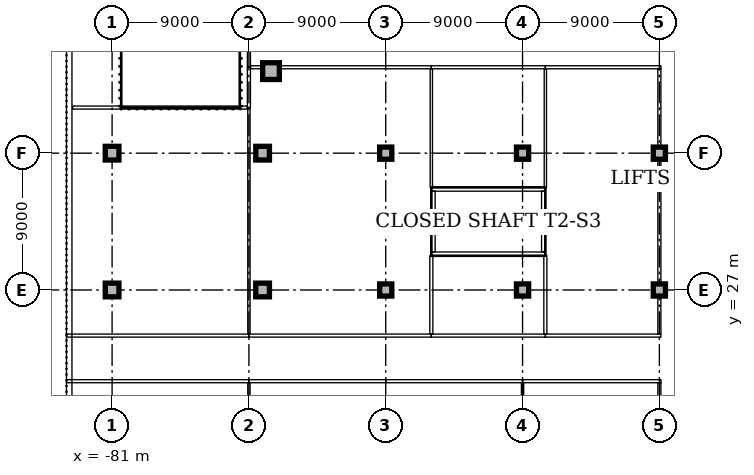
"""IFC4 building model, lengths in metres.
Left out: names, types, materials, properties, quantities, classifications, styles, units other than length and angle.
Written with IfcOpenShell. Run it as: python <this file> out.ifc"""

import sys

from ifc_helpers import new_model, si_unit, direction, frame, frame_2d, origin, origin_2d, place, context, subcontext, project, spatial, rectangle, extrude, element, fill, save


model = new_model("IFC4")
c1 = context("Model", 3, precision=1e-05, world=origin(), true_north=direction((0.0, 1.0)))
c2 = subcontext(c1, "Body", "Model", "MODEL_VIEW")
j1 = project(units=[si_unit("LENGTHUNIT", "METRE"), si_unit("PLANEANGLEUNIT", "RADIAN")], contexts=[c1])
p1 = place(None, origin())
s1 = spatial("IfcSite", under=j1, at=p1, CompositionType="ELEMENT")
p2 = place(p1, origin())
s2 = spatial("IfcBuilding", under=s1, at=p2, CompositionType="ELEMENT")
p3 = place(p2, origin())
s3 = spatial("IfcBuildingStorey", under=s2, at=p3, CompositionType="ELEMENT", Elevation=0.0)
for number, where, z_axis, x_axis in (
    (1, (-60.0, 29.375, 0.0), (0.0, 0.0, 1.0), (1.0, 0.0, 0.0)),
    (2, (-52.5, 33.625, 0.0), (0.0, 0.0, 1.0), (-1.0, 0.0, 0.0)),
):
    element("IfcWall", number, at=place(p3, frame(where, z_axis=z_axis, x_axis=x_axis)), inside=s3, PredefinedType="SOLIDWALL", context=c2, shape_type="SweptSolid", body=[
        extrude(rectangle(XDim=7.5, YDim=0.25, at=frame_2d((3.75, 0.0))), origin(), (0.0, 0.0, 1.0), 6.0),
    ])
for number, where, z_axis, x_axis in (
    (3, (-52.625, 29.5, 0.0), (0.0, 0.0, 1.0), (0.0, 1.0, 0.0)),
    (4, (-59.875, 33.5, 0.0), (0.0, 0.0, 1.0), (0.0, -1.0, 0.0)),
):
    element("IfcWall", number, at=place(p3, frame(where, z_axis=z_axis, x_axis=x_axis)), inside=s3, PredefinedType="SOLIDWALL", context=c2, shape_type="SweptSolid", body=[
        extrude(rectangle(XDim=4.0, YDim=0.25, at=frame_2d((2.0, 0.0))), origin(), (0.0, 0.0, 1.0), 6.0),
    ])
p4 = place(p3, frame((-70.547, 41.398, 0.0), z_axis=(0.0, 0.0, 1.0), x_axis=(1.0, 0.0, 0.0)))
e5 = element("IfcColumn", 5, at=p4, inside=s3, PredefinedType="COLUMN", context=c2, shape_type="SweptSolid", body=[
    extrude(rectangle(XDim=1.1, YDim=1.1, at=origin_2d()), origin(), (0.0, 0.0, 1.0), 5.7),
])
for number, where, z_axis, x_axis in (
    (6, (-71.1, 27.0, 0.0), (0.0, 0.0, 1.0), (1.0, 0.0, 0.0)),
    (7, (-71.1, 36.0, 0.0), (0.0, 0.0, 1.0), (1.0, 0.0, 0.0)),
):
    element("IfcColumn", number, at=place(p3, frame(where, z_axis=z_axis, x_axis=x_axis)), inside=s3, PredefinedType="COLUMN", context=c2, shape_type="SweptSolid", body=[
        extrude(rectangle(XDim=0.9, YDim=0.9, at=origin_2d()), origin(), (0.0, 0.0, 1.0), 5.7),
    ])
for number, where, z_axis, x_axis in (
    (8, (-63.0, 27.0, 0.0), (0.0, 0.0, 1.0), (1.0, 0.0, 0.0)),
    (9, (-63.0, 36.0, 0.0), (0.0, 0.0, 1.0), (1.0, 0.0, 0.0)),
    (10, (-54.0, 27.0, 0.0), (0.0, 0.0, 1.0), (1.0, 0.0, 0.0)),
    (11, (-54.0, 36.0, 0.0), (0.0, 0.0, 1.0), (1.0, 0.0, 0.0)),
    (12, (-45.0, 27.0, 0.0), (0.0, 0.0, 1.0), (1.0, 0.0, 0.0)),
    (13, (-45.0, 36.0, 0.0), (0.0, 0.0, 1.0), (1.0, 0.0, 0.0)),
):
    element("IfcColumn", number, at=place(p3, frame(where, z_axis=z_axis, x_axis=x_axis)), inside=s3, PredefinedType="COLUMN", context=c2, shape_type="SweptSolid", body=[
        extrude(rectangle(XDim=0.8, YDim=0.8, at=origin_2d()), origin(), (0.0, 0.0, 1.0), 5.7),
    ])
for number, where, z_axis, x_axis in (
    (14, (-81.0, 27.0, 0.0), (0.0, 0.0, 1.0), (1.0, 0.0, 0.0)),
    (15, (-81.0, 36.0, 0.0), (0.0, 0.0, 1.0), (1.0, 0.0, 0.0)),
):
    element("IfcColumn", number, at=place(p3, frame(where, z_axis=z_axis, x_axis=x_axis)), inside=s3, PredefinedType="COLUMN", context=c2, shape_type="SweptSolid", body=[
        extrude(rectangle(XDim=0.9, YDim=0.9, at=origin_2d()), origin(), (0.0, 0.0, 1.0), 5.7),
    ])
p5 = place(p3, frame((-83.82, 54.0, 0.0), z_axis=(0.0, 0.0, 1.0), x_axis=(0.0, -1.0, 0.0)))
e16 = element("IfcWall", 16, at=p5, inside=s3, PredefinedType="STANDARD", context=c2, shape_type="SweptSolid", body=[
    extrude(rectangle(XDim=63.0, YDim=0.36, at=frame_2d((31.5, 0.0))), origin(), (0.0, 0.0, 1.0), 5.7),
])
p6 = place(p5, frame((41.4, 0.0, 0.0)))
e17 = element("IfcOpeningElement", 17, at=p6, cuts=e16, PredefinedType="OPENING", context=c2, shape_type="SweptSolid", body=[
    extrude(rectangle(XDim=1.2, YDim=2.2, at=frame_2d((0.6, 1.1))), frame((0.0, 0.19, 0.0), z_axis=(0.0, -1.0, 0.0), x_axis=(1.0, 0.0, 0.0)), (0.0, 0.0, 1.0), 0.38),
])
p7 = place(p5, frame((30.3, 0.0, 0.0)))
e18 = element("IfcOpeningElement", 18, at=p7, cuts=e16, PredefinedType="OPENING", context=c2, shape_type="SweptSolid", body=[
    extrude(rectangle(XDim=2.4, YDim=2.2, at=frame_2d((1.2, 1.1))), frame((0.0, 0.19, 0.0), z_axis=(0.0, -1.0, 0.0), x_axis=(1.0, 0.0, 0.0)), (0.0, 0.0, 1.0), 0.38),
])
p8 = place(p5, frame((11.85, 0.0, 0.6)))
e19 = element("IfcOpeningElement", 19, at=p8, cuts=e16, PredefinedType="OPENING", context=c2, shape_type="SweptSolid", body=[
    extrude(rectangle(XDim=3.3, YDim=3.0, at=frame_2d((1.65, 1.5))), frame((0.0, 0.19, 0.0), z_axis=(0.0, -1.0, 0.0), x_axis=(1.0, 0.0, 0.0)), (0.0, 0.0, 1.0), 0.38),
])
p9 = place(p5, frame((16.35, 0.0, 0.6)))
e20 = element("IfcOpeningElement", 20, at=p9, cuts=e16, PredefinedType="OPENING", context=c2, shape_type="SweptSolid", body=[
    extrude(rectangle(XDim=3.3, YDim=3.0, at=frame_2d((1.65, 1.5))), frame((0.0, 0.19, 0.0), z_axis=(0.0, -1.0, 0.0), x_axis=(1.0, 0.0, 0.0)), (0.0, 0.0, 1.0), 0.38),
])
p10 = place(p5, frame((20.85, 0.0, 0.6)))
e21 = element("IfcOpeningElement", 21, at=p10, cuts=e16, PredefinedType="OPENING", context=c2, shape_type="SweptSolid", body=[
    extrude(rectangle(XDim=3.3, YDim=3.0, at=frame_2d((1.65, 1.5))), frame((0.0, 0.19, 0.0), z_axis=(0.0, -1.0, 0.0), x_axis=(1.0, 0.0, 0.0)), (0.0, 0.0, 1.0), 0.38),
])
p11 = place(p5, frame((25.35, 0.0, 0.6)))
e22 = element("IfcOpeningElement", 22, at=p11, cuts=e16, PredefinedType="OPENING", context=c2, shape_type="SweptSolid", body=[
    extrude(rectangle(XDim=3.3, YDim=3.0, at=frame_2d((1.65, 1.5))), frame((0.0, 0.19, 0.0), z_axis=(0.0, -1.0, 0.0), x_axis=(1.0, 0.0, 0.0)), (0.0, 0.0, 1.0), 0.38),
])
p12 = place(p5, frame((34.35, 0.0, 0.6)))
e23 = element("IfcOpeningElement", 23, at=p12, cuts=e16, PredefinedType="OPENING", context=c2, shape_type="SweptSolid", body=[
    extrude(rectangle(XDim=3.3, YDim=3.0, at=frame_2d((1.65, 1.5))), frame((0.0, 0.19, 0.0), z_axis=(0.0, -1.0, 0.0), x_axis=(1.0, 0.0, 0.0)), (0.0, 0.0, 1.0), 0.38),
])
p13 = place(p5, frame((43.35, 0.0, 0.6)))
e24 = element("IfcOpeningElement", 24, at=p13, cuts=e16, PredefinedType="OPENING", context=c2, shape_type="SweptSolid", body=[
    extrude(rectangle(XDim=3.3, YDim=3.0, at=frame_2d((1.65, 1.5))), frame((0.0, 0.19, 0.0), z_axis=(0.0, -1.0, 0.0), x_axis=(1.0, 0.0, 0.0)), (0.0, 0.0, 1.0), 0.38),
])
p14 = place(p5, frame((47.85, 0.0, 0.6)))
e25 = element("IfcOpeningElement", 25, at=p14, cuts=e16, PredefinedType="OPENING", context=c2, shape_type="SweptSolid", body=[
    extrude(rectangle(XDim=3.3, YDim=3.0, at=frame_2d((1.65, 1.5))), frame((0.0, 0.19, 0.0), z_axis=(0.0, -1.0, 0.0), x_axis=(1.0, 0.0, 0.0)), (0.0, 0.0, 1.0), 0.38),
])
p15 = place(p5, frame((52.35, 0.0, 0.6)))
e26 = element("IfcOpeningElement", 26, at=p15, cuts=e16, PredefinedType="OPENING", context=c2, shape_type="SweptSolid", body=[
    extrude(rectangle(XDim=3.3, YDim=3.0, at=frame_2d((1.65, 1.5))), frame((0.0, 0.19, 0.0), z_axis=(0.0, -1.0, 0.0), x_axis=(1.0, 0.0, 0.0)), (0.0, 0.0, 1.0), 0.38),
])
p16 = place(p5, frame((56.85, 0.0, 0.6)))
e27 = element("IfcOpeningElement", 27, at=p16, cuts=e16, PredefinedType="OPENING", context=c2, shape_type="SweptSolid", body=[
    extrude(rectangle(XDim=3.3, YDim=3.0, at=frame_2d((1.65, 1.5))), frame((0.0, 0.19, 0.0), z_axis=(0.0, -1.0, 0.0), x_axis=(1.0, 0.0, 0.0)), (0.0, 0.0, 1.0), 0.38),
])
p17 = place(p3, frame((-72.0, 41.65, 0.0), z_axis=(0.0, 0.0, 1.0), x_axis=(0.0, 1.0, 0.0)))
e28 = element("IfcWall", 28, at=p17, inside=s3, PredefinedType="PARTITIONING", context=c2, shape_type="SweptSolid", body=[
    extrude(rectangle(XDim=3.35, YDim=0.2, at=frame_2d((1.675, 0.0))), origin(), (0.0, 0.0, 1.0), 5.7),
])
p18 = place(p3, frame((-83.6, 39.0, 0.0), z_axis=(0.0, 0.0, 1.0), x_axis=(1.0, 0.0, 0.0)))
e29 = element("IfcWall", 29, at=p18, inside=s3, PredefinedType="PARTITIONING", context=c2, shape_type="SweptSolid", body=[
    extrude(rectangle(XDim=11.5, YDim=0.2, at=frame_2d((5.75, 0.0))), origin(), (0.0, 0.0, 1.0), 5.7),
])
p19 = place(p3, frame((-72.0, 39.0, 0.0), z_axis=(0.0, 0.0, 1.0), x_axis=(0.0, 1.0, 0.0)))
e30 = element("IfcWall", 30, at=p19, inside=s3, PredefinedType="PARTITIONING", context=c2, shape_type="SweptSolid", body=[
    extrude(rectangle(XDim=2.65, YDim=0.2, at=frame_2d((1.325, 0.0))), origin(), (0.0, 0.0, 1.0), 5.7),
])
for number, where, z_axis, x_axis in (
    (31, (-45.0, 18.42, 0.0), (0.0, 0.0, 1.0), (0.0, 1.0, 0.0)),
    (32, (-45.0, 24.1, 0.0), (0.0, 0.0, 1.0), (0.0, 1.0, 0.0)),
):
    element("IfcWall", number, at=place(p3, frame(where, z_axis=z_axis, x_axis=x_axis)), inside=s3, PredefinedType="PARTITIONING", context=c2, shape_type="SweptSolid", body=[
        extrude(rectangle(XDim=2.48, YDim=0.2, at=frame_2d((1.24, 0.0))), origin(), (0.0, 0.0, 1.0), 5.7),
    ])
p20 = place(p3, frame((-45.0, 27.42, 0.0), z_axis=(0.0, 0.0, 1.0), x_axis=(0.0, 1.0, 0.0)))
e33 = element("IfcWall", 33, at=p20, inside=s3, PredefinedType="PARTITIONING", context=c2, shape_type="SweptSolid", body=[
    extrude(rectangle(XDim=8.16, YDim=0.2, at=frame_2d((4.08, 0.0))), origin(), (0.0, 0.0, 1.0), 5.7),
])
p21 = place(p20, frame((4.905, 0.0, 0.0)))
e34 = element("IfcOpeningElement", 34, at=p21, cuts=e33, PredefinedType="OPENING", context=c2, shape_type="SweptSolid", body=[
    extrude(rectangle(XDim=1.0, YDim=2.1, at=frame_2d((0.5, 1.05))), frame((0.0, 0.11, 0.0), z_axis=(0.0, -1.0, 0.0), x_axis=(1.0, 0.0, 0.0)), (0.0, 0.0, 1.0), 0.22),
])
p22 = place(p3, frame((-45.0, 36.42, 0.0), z_axis=(0.0, 0.0, 1.0), x_axis=(0.0, 1.0, 0.0)))
e35 = element("IfcWall", 35, at=p22, inside=s3, PredefinedType="PARTITIONING", context=c2, shape_type="SweptSolid", body=[
    extrude(rectangle(XDim=5.13, YDim=0.2, at=frame_2d((2.565, 0.0))), origin(), (0.0, 0.0, 1.0), 5.7),
])
p23 = place(p3, frame((-84.0, 21.0, 0.0), z_axis=(0.0, 0.0, 1.0), x_axis=(1.0, 0.0, 0.0)))
e36 = element("IfcWall", 36, at=p23, inside=s3, PredefinedType="PARTITIONING", context=c2, shape_type="SweptSolid", body=[
    extrude(rectangle(XDim=12.0, YDim=0.2, at=frame_2d((6.0, 0.0))), origin(), (0.0, 0.0, 1.0), 5.7),
])
for number, where, z_axis, x_axis in (
    (37, (-63.0, 21.0, 0.0), (0.0, 0.0, 1.0), (1.0, 0.0, 0.0)),
    (38, (-72.0, 21.0, 0.0), (0.0, 0.0, 1.0), (1.0, 0.0, 0.0)),
):
    element("IfcWall", number, at=place(p3, frame(where, z_axis=z_axis, x_axis=x_axis)), inside=s3, PredefinedType="PARTITIONING", context=c2, shape_type="SweptSolid", body=[
        extrude(rectangle(XDim=9.0, YDim=0.2, at=frame_2d((4.5, 0.0))), origin(), (0.0, 0.0, 1.0), 5.7),
    ])
p24 = place(p3, frame((-54.0, 21.0, 0.0), z_axis=(0.0, 0.0, 1.0), x_axis=(1.0, 0.0, 0.0)))
e39 = element("IfcWall", 39, at=p24, inside=s3, PredefinedType="PARTITIONING", context=c2, shape_type="SweptSolid", body=[
    extrude(rectangle(XDim=9.1, YDim=0.2, at=frame_2d((4.55, 0.0))), origin(), (0.0, 0.0, 1.0), 5.7),
])
p25 = place(p3, frame((-84.0, 24.0, 0.0), z_axis=(0.0, 0.0, 1.0), x_axis=(1.0, 0.0, 0.0)))
e40 = element("IfcWall", 40, at=p25, inside=s3, PredefinedType="PARTITIONING", context=c2, shape_type="SweptSolid", body=[
    extrude(rectangle(XDim=12.0, YDim=0.2, at=frame_2d((6.0, 0.0))), origin(), (0.0, 0.0, 1.0), 5.7),
])
p26 = place(p25, frame((5.5, 0.0, 0.0)))
e41 = element("IfcOpeningElement", 41, at=p26, cuts=e40, PredefinedType="OPENING", context=c2, shape_type="SweptSolid", body=[
    extrude(rectangle(XDim=1.0, YDim=2.1, at=frame_2d((0.5, 1.05))), frame((0.0, 0.11, 0.0), z_axis=(0.0, -1.0, 0.0), x_axis=(1.0, 0.0, 0.0)), (0.0, 0.0, 1.0), 0.22),
])
p27 = place(p3, frame((-72.0, 24.0, 0.0), z_axis=(0.0, 0.0, 1.0), x_axis=(1.0, 0.0, 0.0)))
e42 = element("IfcWall", 42, at=p27, inside=s3, PredefinedType="PARTITIONING", context=c2, shape_type="SweptSolid", body=[
    extrude(rectangle(XDim=12.0, YDim=0.2, at=frame_2d((6.0, 0.0))), origin(), (0.0, 0.0, 1.0), 5.7),
])
p28 = place(p27, frame((5.5, 0.0, 0.0)))
e43 = element("IfcOpeningElement", 43, at=p28, cuts=e42, PredefinedType="OPENING", context=c2, shape_type="SweptSolid", body=[
    extrude(rectangle(XDim=1.0, YDim=2.1, at=frame_2d((0.5, 1.05))), frame((0.0, 0.11, 0.0), z_axis=(0.0, -1.0, 0.0), x_axis=(1.0, 0.0, 0.0)), (0.0, 0.0, 1.0), 0.22),
])
p29 = place(p3, frame((-60.0, 24.0, 0.0), z_axis=(0.0, 0.0, 1.0), x_axis=(1.0, 0.0, 0.0)))
e44 = element("IfcWall", 44, at=p29, inside=s3, PredefinedType="PARTITIONING", context=c2, shape_type="SweptSolid", body=[
    extrude(rectangle(XDim=7.5, YDim=0.2, at=frame_2d((3.75, 0.0))), origin(), (0.0, 0.0, 1.0), 5.7),
])
p30 = place(p29, frame((3.25, 0.0, 0.0)))
e45 = element("IfcOpeningElement", 45, at=p30, cuts=e44, PredefinedType="OPENING", context=c2, shape_type="SweptSolid", body=[
    extrude(rectangle(XDim=1.0, YDim=2.1, at=frame_2d((0.5, 1.05))), frame((0.0, 0.11, 0.0), z_axis=(0.0, -1.0, 0.0), x_axis=(1.0, 0.0, 0.0)), (0.0, 0.0, 1.0), 0.22),
])
p31 = place(p3, frame((-52.5, 24.0, 0.0), z_axis=(0.0, 0.0, 1.0), x_axis=(1.0, 0.0, 0.0)))
e46 = element("IfcWall", 46, at=p31, inside=s3, PredefinedType="PARTITIONING", context=c2, shape_type="SweptSolid", body=[
    extrude(rectangle(XDim=7.6, YDim=0.2, at=frame_2d((3.8, 0.0))), origin(), (0.0, 0.0, 1.0), 5.7),
])
p32 = place(p3, frame((-71.9, 41.65, 0.0), z_axis=(0.0, 0.0, 1.0), x_axis=(1.0, 0.0, 0.0)))
e47 = element("IfcWall", 47, at=p32, inside=s3, PredefinedType="PARTITIONING", context=c2, shape_type="SweptSolid", body=[
    extrude(rectangle(XDim=0.783, YDim=0.2, at=frame_2d((0.392, 0.0))), origin(), (0.0, 0.0, 1.0), 5.7),
])
p33 = place(p3, frame((-69.977, 41.65, 0.0), z_axis=(0.0, 0.0, 1.0), x_axis=(1.0, 0.0, 0.0)))
e48 = element("IfcWall", 48, at=p33, inside=s3, PredefinedType="PARTITIONING", context=c2, shape_type="SweptSolid", body=[
    extrude(rectangle(XDim=9.977, YDim=0.2, at=frame_2d((4.989, 0.0))), origin(), (0.0, 0.0, 1.0), 5.7),
])
p34 = place(p3, frame((-60.0, 41.65, 0.0), z_axis=(0.0, 0.0, 1.0), x_axis=(1.0, 0.0, 0.0)))
e49 = element("IfcWall", 49, at=p34, inside=s3, PredefinedType="PARTITIONING", context=c2, shape_type="SweptSolid", body=[
    extrude(rectangle(XDim=7.5, YDim=0.2, at=frame_2d((3.75, 0.0))), origin(), (0.0, 0.0, 1.0), 5.7),
])
p35 = place(p34, frame((3.25, 0.0, 0.0)))
e50 = element("IfcOpeningElement", 50, at=p35, cuts=e49, PredefinedType="OPENING", context=c2, shape_type="SweptSolid", body=[
    extrude(rectangle(XDim=1.0, YDim=2.1, at=frame_2d((0.5, 1.05))), frame((0.0, 0.11, 0.0), z_axis=(0.0, -1.0, 0.0), x_axis=(1.0, 0.0, 0.0)), (0.0, 0.0, 1.0), 0.22),
])
p36 = place(p3, frame((-52.5, 41.65, 0.0), z_axis=(0.0, 0.0, 1.0), x_axis=(1.0, 0.0, 0.0)))
e51 = element("IfcWall", 51, at=p36, inside=s3, PredefinedType="PARTITIONING", context=c2, shape_type="SweptSolid", body=[
    extrude(rectangle(XDim=7.6, YDim=0.2, at=frame_2d((3.8, 0.0))), origin(), (0.0, 0.0, 1.0), 5.7),
])
p37 = place(p3, frame((-72.0, 3.7, 0.0), z_axis=(0.0, 0.0, 1.0), x_axis=(0.0, 1.0, 0.0)))
e52 = element("IfcWall", 52, at=p37, inside=s3, PredefinedType="PARTITIONING", context=c2, shape_type="SweptSolid", body=[
    extrude(rectangle(XDim=17.2, YDim=0.15, at=frame_2d((8.6, 0.0))), origin(), (0.0, 0.0, 1.0), 5.7),
])
p38 = place(p3, frame((-54.0, 18.42, 0.0), z_axis=(0.0, 0.0, 1.0), x_axis=(0.0, 1.0, 0.0)))
e53 = element("IfcWall", 53, at=p38, inside=s3, PredefinedType="PARTITIONING", context=c2, shape_type="SweptSolid", body=[
    extrude(rectangle(XDim=2.48, YDim=0.15, at=frame_2d((1.24, 0.0))), origin(), (0.0, 0.0, 1.0), 5.7),
])
p39 = place(p3, frame((-72.0, 24.1, 0.0), z_axis=(0.0, 0.0, 1.0), x_axis=(0.0, 1.0, 0.0)))
e54 = element("IfcWall", 54, at=p39, inside=s3, PredefinedType="PARTITIONING", context=c2, shape_type="SweptSolid", body=[
    extrude(rectangle(XDim=14.9, YDim=0.15, at=frame_2d((7.45, 0.0))), origin(), (0.0, 0.0, 1.0), 5.7),
])
p40 = place(p3, frame((-60.0, 24.1, 0.0), z_axis=(0.0, 0.0, 1.0), x_axis=(0.0, 1.0, 0.0)))
e55 = element("IfcWall", 55, at=p40, inside=s3, PredefinedType="PARTITIONING", context=c2, shape_type="SweptSolid", body=[
    extrude(rectangle(XDim=5.15, YDim=0.2, at=frame_2d((2.575, 0.0))), origin(), (0.0, 0.0, 1.0), 5.7),
])
p41 = place(p3, frame((-60.0, 33.75, 0.0), z_axis=(0.0, 0.0, 1.0), x_axis=(0.0, 1.0, 0.0)))
e56 = element("IfcWall", 56, at=p41, inside=s3, PredefinedType="PARTITIONING", context=c2, shape_type="SweptSolid", body=[
    extrude(rectangle(XDim=7.8, YDim=0.15, at=frame_2d((3.9, 0.0))), origin(), (0.0, 0.0, 1.0), 5.7),
])
p42 = place(p3, frame((-52.5, 24.1, 0.0), z_axis=(0.0, 0.0, 1.0), x_axis=(0.0, 1.0, 0.0)))
e57 = element("IfcWall", 57, at=p42, inside=s3, PredefinedType="PARTITIONING", context=c2, shape_type="SweptSolid", body=[
    extrude(rectangle(XDim=5.15, YDim=0.2, at=frame_2d((2.575, 0.0))), origin(), (0.0, 0.0, 1.0), 5.7),
])
p43 = place(p3, frame((-52.5, 33.75, 0.0), z_axis=(0.0, 0.0, 1.0), x_axis=(0.0, 1.0, 0.0)))
e58 = element("IfcWall", 58, at=p43, inside=s3, PredefinedType="PARTITIONING", context=c2, shape_type="SweptSolid", body=[
    extrude(rectangle(XDim=7.8, YDim=0.15, at=frame_2d((3.9, 0.0))), origin(), (0.0, 0.0, 1.0), 5.7),
])
p44 = place(p7, frame((2.4, 0.0, 0.0), z_axis=(0.0, 0.0, 1.0), x_axis=(-1.0, 0.0, 0.0)))
e59 = element("IfcDoor", 59, at=p44, inside=s3, OperationType="DOUBLE_DOOR_SINGLE_SWING", PredefinedType="DOOR", context=c2, shape_type="SweptSolid", body=[
    extrude(rectangle(XDim=2.4, YDim=2.2, at=frame_2d((1.2, 1.1))), frame((0.0, -0.07, 0.0), z_axis=(0.0, -1.0, 0.0), x_axis=(1.0, 0.0, 0.0)), (0.0, 0.0, 1.0), 0.05),
])
fill(e18, e59)
p45 = place(p8, origin())
e60 = element("IfcWindow", 60, at=p45, inside=s3, PartitioningType="SINGLE_PANEL", PredefinedType="WINDOW", context=c2, shape_type="SweptSolid", body=[
    extrude(rectangle(XDim=3.3, YDim=3.0, at=frame_2d((1.65, 1.5))), frame((0.0, 0.13, 0.0), z_axis=(0.0, -1.0, 0.0), x_axis=(1.0, 0.0, 0.0)), (0.0, 0.0, 1.0), 0.06),
])
fill(e19, e60)
p46 = place(p9, origin())
e61 = element("IfcWindow", 61, at=p46, inside=s3, PartitioningType="SINGLE_PANEL", PredefinedType="WINDOW", context=c2, shape_type="SweptSolid", body=[
    extrude(rectangle(XDim=3.3, YDim=3.0, at=frame_2d((1.65, 1.5))), frame((0.0, 0.13, 0.0), z_axis=(0.0, -1.0, 0.0), x_axis=(1.0, 0.0, 0.0)), (0.0, 0.0, 1.0), 0.06),
])
fill(e20, e61)
p47 = place(p10, origin())
e62 = element("IfcWindow", 62, at=p47, inside=s3, PartitioningType="SINGLE_PANEL", PredefinedType="WINDOW", context=c2, shape_type="SweptSolid", body=[
    extrude(rectangle(XDim=3.3, YDim=3.0, at=frame_2d((1.65, 1.5))), frame((0.0, 0.13, 0.0), z_axis=(0.0, -1.0, 0.0), x_axis=(1.0, 0.0, 0.0)), (0.0, 0.0, 1.0), 0.06),
])
fill(e21, e62)
p48 = place(p11, origin())
e63 = element("IfcWindow", 63, at=p48, inside=s3, PartitioningType="SINGLE_PANEL", PredefinedType="WINDOW", context=c2, shape_type="SweptSolid", body=[
    extrude(rectangle(XDim=3.3, YDim=3.0, at=frame_2d((1.65, 1.5))), frame((0.0, 0.13, 0.0), z_axis=(0.0, -1.0, 0.0), x_axis=(1.0, 0.0, 0.0)), (0.0, 0.0, 1.0), 0.06),
])
fill(e22, e63)
p49 = place(p26, origin())
e64 = element("IfcDoor", 64, at=p49, inside=s3, OperationType="SINGLE_SWING_LEFT", PredefinedType="DOOR", context=c2, shape_type="SweptSolid", body=[
    extrude(rectangle(XDim=1.0, YDim=2.1, at=frame_2d((0.5, 1.05))), frame((0.0, 0.025, 0.0), z_axis=(0.0, -1.0, 0.0), x_axis=(1.0, 0.0, 0.0)), (0.0, 0.0, 1.0), 0.05),
])
fill(e41, e64)
p50 = place(p28, origin())
e65 = element("IfcDoor", 65, at=p50, inside=s3, OperationType="SINGLE_SWING_LEFT", PredefinedType="DOOR", context=c2, shape_type="SweptSolid", body=[
    extrude(rectangle(XDim=1.0, YDim=2.1, at=frame_2d((0.5, 1.05))), frame((0.0, 0.025, 0.0), z_axis=(0.0, -1.0, 0.0), x_axis=(1.0, 0.0, 0.0)), (0.0, 0.0, 1.0), 0.05),
])
fill(e43, e65)
p51 = place(p30, origin())
e66 = element("IfcDoor", 66, at=p51, inside=s3, OperationType="SINGLE_SWING_LEFT", PredefinedType="DOOR", context=c2, shape_type="SweptSolid", body=[
    extrude(rectangle(XDim=1.0, YDim=2.1, at=frame_2d((0.5, 1.05))), frame((0.0, 0.025, 0.0), z_axis=(0.0, -1.0, 0.0), x_axis=(1.0, 0.0, 0.0)), (0.0, 0.0, 1.0), 0.05),
])
fill(e45, e66)
p52 = place(p35, frame((1.0, 0.0, 0.0), z_axis=(0.0, 0.0, 1.0), x_axis=(-1.0, 0.0, 0.0)))
e67 = element("IfcDoor", 67, at=p52, inside=s3, OperationType="SINGLE_SWING_LEFT", PredefinedType="DOOR", context=c2, shape_type="SweptSolid", body=[
    extrude(rectangle(XDim=1.0, YDim=2.1, at=frame_2d((0.5, 1.05))), frame((0.0, 0.025, 0.0), z_axis=(0.0, -1.0, 0.0), x_axis=(1.0, 0.0, 0.0)), (0.0, 0.0, 1.0), 0.05),
])
fill(e50, e67)
p53 = place(p21, origin())
e68 = element("IfcDoor", 68, at=p53, inside=s3, OperationType="SINGLE_SWING_LEFT", PredefinedType="DOOR", context=c2, shape_type="SweptSolid", body=[
    extrude(rectangle(XDim=1.0, YDim=2.1, at=frame_2d((0.5, 1.05))), frame((0.0, 0.025, 0.0), z_axis=(0.0, -1.0, 0.0), x_axis=(1.0, 0.0, 0.0)), (0.0, 0.0, 1.0), 0.05),
])
fill(e34, e68)
save(model, sys.argv[1])
